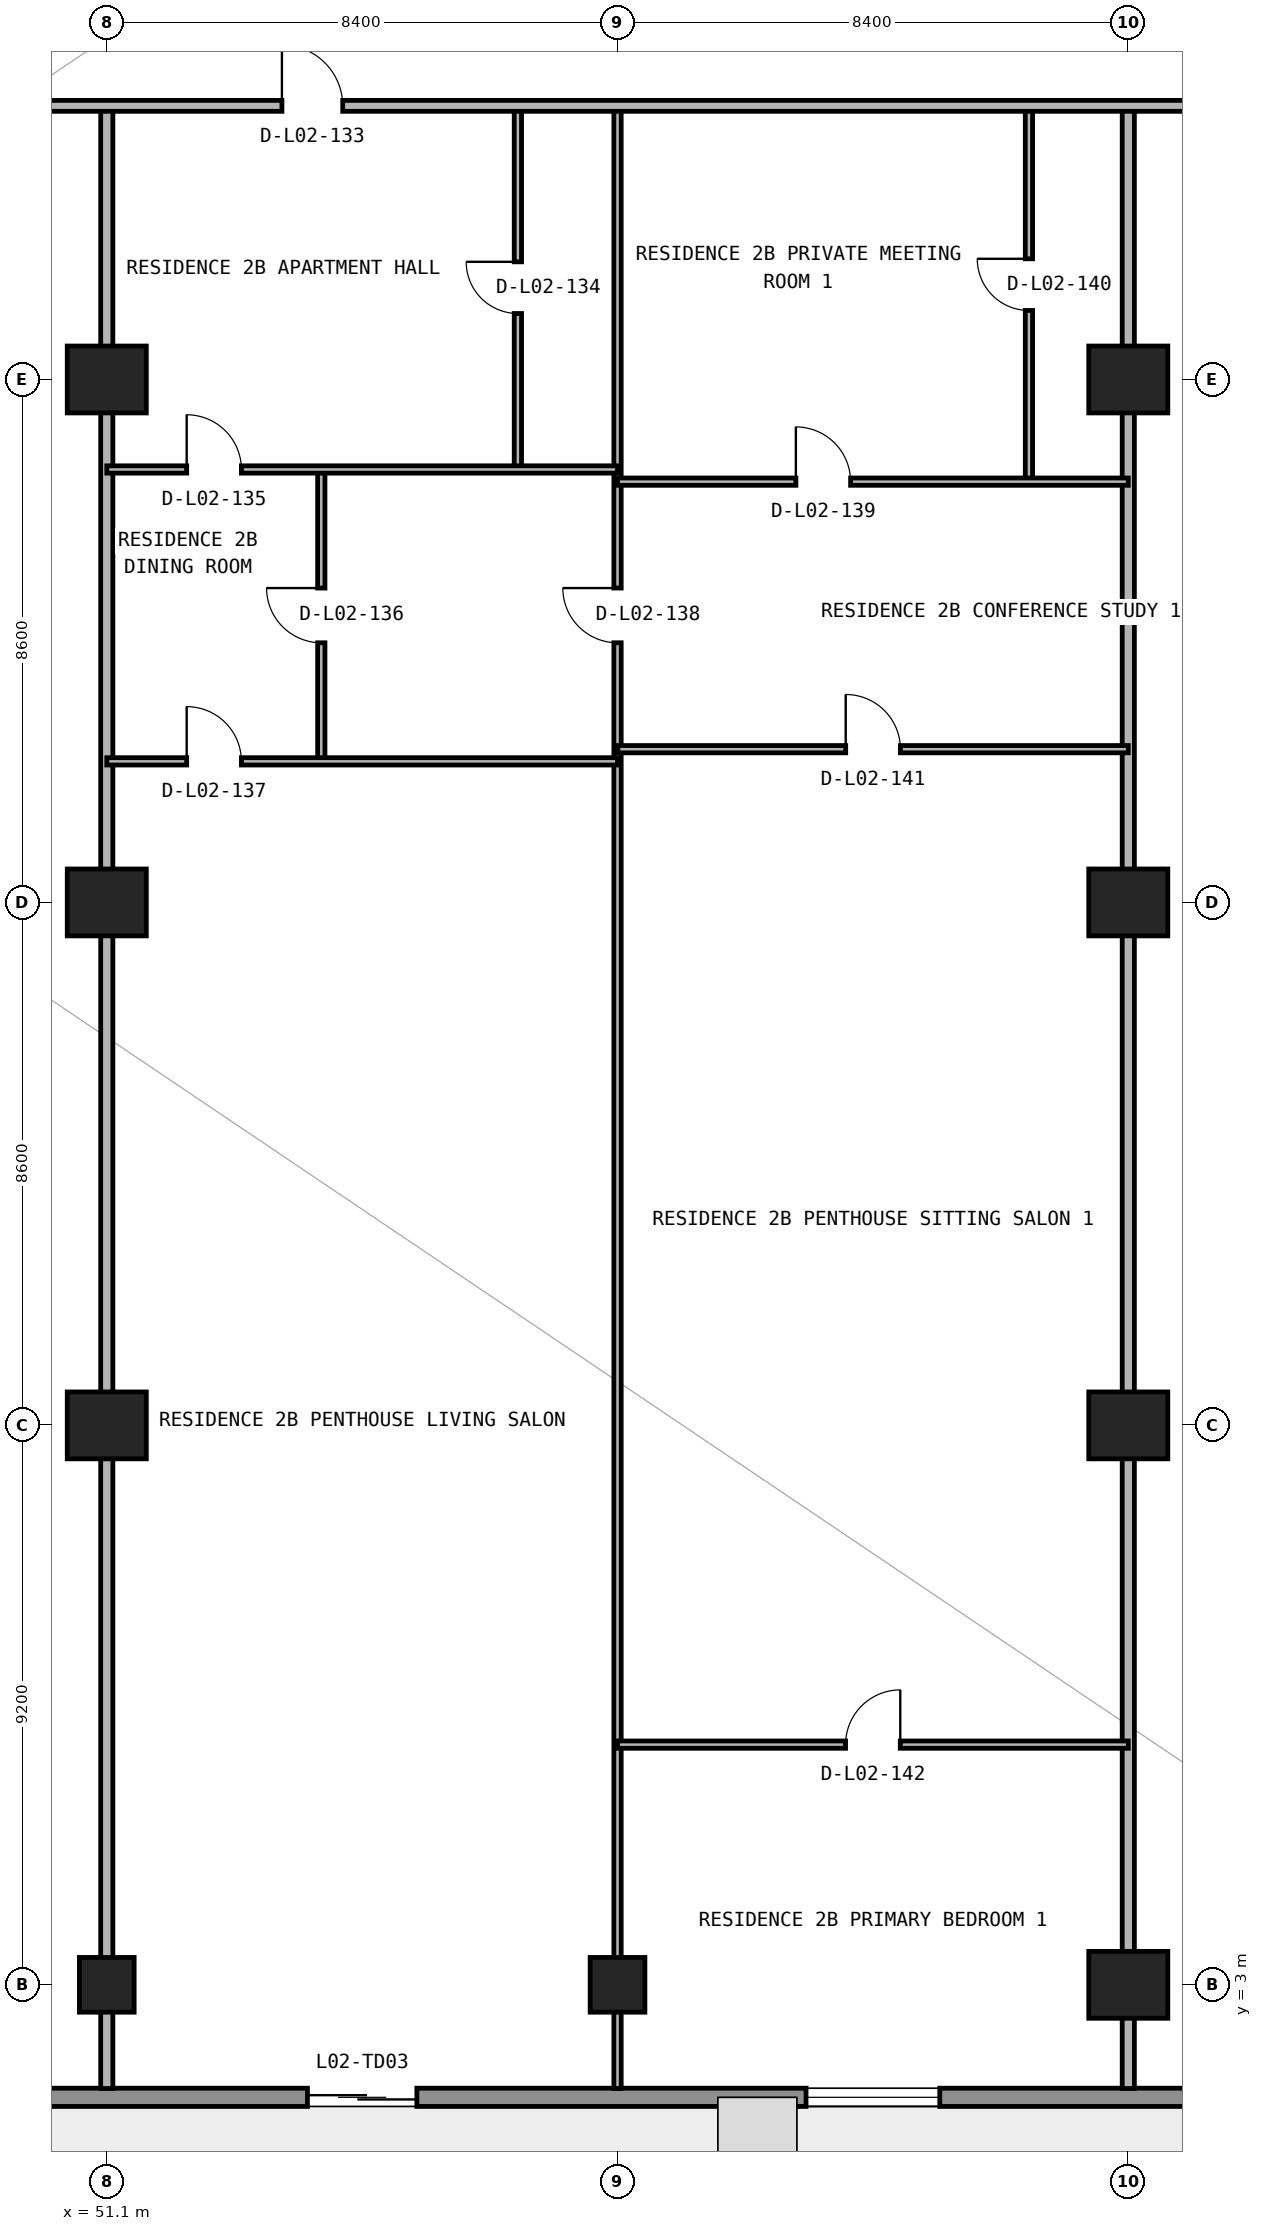
"""IFC4 building model, lengths in metres.
Left out: names, types, materials, properties, quantities, classifications, styles, units other than length and angle.
Written with IfcOpenShell. Run it as: python <this file> out.ifc"""

import sys

from ifc_helpers import new_model, si_unit, direction, frame, frame_2d, origin, origin_2d, place, context, subcontext, project, spatial, rectangle, circle, extrude, element, fill, save


model = new_model("IFC4")
c1 = context("Model", 3, precision=1e-05, world=origin(), true_north=direction((0.0, 1.0)))
c2 = subcontext(c1, "Body", "Model", "MODEL_VIEW")
j1 = project(units=[si_unit("LENGTHUNIT", "METRE"), si_unit("PLANEANGLEUNIT", "RADIAN")], contexts=[c1])
p1 = place(None, origin())
s1 = spatial("IfcSite", under=j1, at=p1, CompositionType="ELEMENT")
p2 = place(p1, origin())
s2 = spatial("IfcBuilding", under=s1, at=p2, CompositionType="ELEMENT")
p3 = place(p2, frame((0.0, 0.0, 10.2)))
s3 = spatial("IfcBuildingStorey", under=s2, at=p3, CompositionType="ELEMENT", Elevation=10.2)
for number, where, z_axis, x_axis in (
    (1, (51.1, 3.0, 0.0), (0.0, 0.0, 1.0), (1.0, 0.0, 0.0)),
    (2, (59.5, 3.0, 0.0), (0.0, 0.0, 1.0), (1.0, 0.0, 0.0)),
):
    element("IfcColumn", number, at=place(p3, frame(where, z_axis=z_axis, x_axis=x_axis)), inside=s3, PredefinedType="COLUMN", context=c2, shape_type="SweptSolid", body=[
        extrude(circle(Radius=0.45, at=origin_2d()), origin(), (0.0, 0.0, 1.0), 4.5),
    ])
for number, where, z_axis, x_axis in (
    (3, (67.9, 3.0, 0.0), (0.0, 0.0, 1.0), (1.0, 0.0, 0.0)),
    (4, (51.1, 12.2, 0.0), (0.0, 0.0, 1.0), (1.0, 0.0, 0.0)),
    (5, (67.9, 12.2, 0.0), (0.0, 0.0, 1.0), (1.0, 0.0, 0.0)),
    (6, (51.1, 20.8, 0.0), (0.0, 0.0, 1.0), (1.0, 0.0, 0.0)),
    (7, (67.9, 20.8, 0.0), (0.0, 0.0, 1.0), (1.0, 0.0, 0.0)),
    (8, (51.1, 29.4, 0.0), (0.0, 0.0, 1.0), (1.0, 0.0, 0.0)),
    (9, (67.9, 29.4, 0.0), (0.0, 0.0, 1.0), (1.0, 0.0, 0.0)),
):
    element("IfcColumn", number, at=place(p3, frame(where, z_axis=z_axis, x_axis=x_axis)), inside=s3, PredefinedType="COLUMN", context=c2, shape_type="SweptSolid", body=[
        extrude(rectangle(XDim=1.3, YDim=1.1, at=origin_2d()), origin(), (0.0, 0.0, 1.0), 4.5),
    ])
p4 = place(p3, frame((77.2, 1.15, 0.0), z_axis=(0.0, 0.0, 1.0), x_axis=(-1.0, 0.0, 0.0)))
e10 = element("IfcWall", 10, at=p4, inside=s3, PredefinedType="STANDARD", context=c2, shape_type="SweptSolid", body=[
    extrude(rectangle(XDim=76.6, YDim=0.3, at=frame_2d((38.3, 0.0))), origin(), (0.0, 0.0, 1.0), 4.5),
])
p5 = place(p4, frame((70.375, 0.0, 0.85)))
e11 = element("IfcOpeningElement", 11, at=p5, cuts=e10, PredefinedType="OPENING", context=c2, shape_type="SweptSolid", body=[
    extrude(rectangle(XDim=3.0, YDim=2.4, at=frame_2d((1.5, 1.2))), frame((0.0, 0.16, 0.0), z_axis=(0.0, -1.0, 0.0), x_axis=(1.0, 0.0, 0.0)), (0.0, 0.0, 1.0), 0.32),
])
p6 = place(p4, frame((62.2, 0.0, 0.0)))
e12 = element("IfcOpeningElement", 12, at=p6, cuts=e10, PredefinedType="OPENING", context=c2, shape_type="SweptSolid", body=[
    extrude(rectangle(XDim=1.8, YDim=2.3, at=frame_2d((0.9, 1.15))), frame((0.0, 0.16, 0.0), z_axis=(0.0, -1.0, 0.0), x_axis=(1.0, 0.0, 0.0)), (0.0, 0.0, 1.0), 0.32),
])
p7 = place(p4, frame((53.6, 0.0, 0.85)))
e13 = element("IfcOpeningElement", 13, at=p7, cuts=e10, PredefinedType="OPENING", context=c2, shape_type="SweptSolid", body=[
    extrude(rectangle(XDim=2.2, YDim=1.55, at=frame_2d((1.1, 0.775))), frame((0.0, 0.16, 0.0), z_axis=(0.0, -1.0, 0.0), x_axis=(1.0, 0.0, 0.0)), (0.0, 0.0, 1.0), 0.32),
])
p8 = place(p4, frame((37.4, 0.0, 0.0)))
e14 = element("IfcOpeningElement", 14, at=p8, cuts=e10, PredefinedType="OPENING", context=c2, shape_type="SweptSolid", body=[
    extrude(rectangle(XDim=1.8, YDim=2.3, at=frame_2d((0.9, 1.15))), frame((0.0, 0.16, 0.0), z_axis=(0.0, -1.0, 0.0), x_axis=(1.0, 0.0, 0.0)), (0.0, 0.0, 1.0), 0.32),
])
p9 = place(p4, frame((21.0, 0.0, 0.0)))
e15 = element("IfcOpeningElement", 15, at=p9, cuts=e10, PredefinedType="OPENING", context=c2, shape_type="SweptSolid", body=[
    extrude(rectangle(XDim=1.8, YDim=2.3, at=frame_2d((0.9, 1.15))), frame((0.0, 0.16, 0.0), z_axis=(0.0, -1.0, 0.0), x_axis=(1.0, 0.0, 0.0)), (0.0, 0.0, 1.0), 0.32),
])
p10 = place(p4, frame((12.4, 0.0, 0.85)))
e16 = element("IfcOpeningElement", 16, at=p10, cuts=e10, PredefinedType="OPENING", context=c2, shape_type="SweptSolid", body=[
    extrude(rectangle(XDim=2.2, YDim=1.55, at=frame_2d((1.1, 0.775))), frame((0.0, 0.16, 0.0), z_axis=(0.0, -1.0, 0.0), x_axis=(1.0, 0.0, 0.0)), (0.0, 0.0, 1.0), 0.32),
])
p11 = place(p4, frame((3.825, 0.0, 0.0)))
e17 = element("IfcOpeningElement", 17, at=p11, cuts=e10, PredefinedType="OPENING", context=c2, shape_type="SweptSolid", body=[
    extrude(rectangle(XDim=1.8, YDim=2.3, at=frame_2d((0.9, 1.15))), frame((0.0, 0.16, 0.0), z_axis=(0.0, -1.0, 0.0), x_axis=(1.0, 0.0, 0.0)), (0.0, 0.0, 1.0), 0.32),
])
p12 = place(p3, frame((51.1, 1.295, 0.0), z_axis=(0.0, 0.0, 1.0), x_axis=(0.0, 1.0, 0.0)))
e18 = element("IfcWall", 18, at=p12, inside=s3, PredefinedType="PARTITIONING", context=c2, shape_type="SweptSolid", body=[
    extrude(rectangle(XDim=32.605, YDim=0.2, at=frame_2d((16.302, 0.0))), origin(), (0.0, 0.0, 1.0), 3.464),
])
p13 = place(p3, frame((54.628, 23.12, 0.0), z_axis=(0.0, 0.0, 1.0), x_axis=(0.0, 1.0, 0.0)))
e19 = element("IfcWall", 19, at=p13, inside=s3, PredefinedType="PARTITIONING", context=c2, shape_type="SweptSolid", body=[
    extrude(rectangle(XDim=4.8, YDim=0.12, at=frame_2d((2.4, 0.0))), origin(), (0.0, 0.0, 1.0), 3.873),
])
p14 = place(p13, frame((1.95, 0.0, 0.0)))
e20 = element("IfcOpeningElement", 20, at=p14, cuts=e19, PredefinedType="OPENING", context=c2, shape_type="SweptSolid", body=[
    extrude(rectangle(XDim=0.9, YDim=2.15, at=frame_2d((0.45, 1.075))), frame((0.0, 0.07, 0.0), z_axis=(0.0, -1.0, 0.0), x_axis=(1.0, 0.0, 0.0)), (0.0, 0.0, 1.0), 0.14),
])
p15 = place(p3, frame((57.861, 27.92, 0.0), z_axis=(0.0, 0.0, 1.0), x_axis=(0.0, 1.0, 0.0)))
e21 = element("IfcWall", 21, at=p15, inside=s3, PredefinedType="PARTITIONING", context=c2, shape_type="SweptSolid", body=[
    extrude(rectangle(XDim=5.98, YDim=0.12, at=frame_2d((2.99, 0.0))), origin(), (0.0, 0.0, 1.0), 3.873),
])
p16 = place(p15, frame((2.565, 0.0, 0.0)))
e22 = element("IfcOpeningElement", 22, at=p16, cuts=e21, PredefinedType="OPENING", context=c2, shape_type="SweptSolid", body=[
    extrude(rectangle(XDim=0.85, YDim=2.1, at=frame_2d((0.425, 1.05))), frame((0.0, 0.07, 0.0), z_axis=(0.0, -1.0, 0.0), x_axis=(1.0, 0.0, 0.0)), (0.0, 0.0, 1.0), 0.14),
])
p17 = place(p3, frame((59.5, 1.295, 0.0), z_axis=(0.0, 0.0, 1.0), x_axis=(0.0, 1.0, 0.0)))
e23 = element("IfcWall", 23, at=p17, inside=s3, PredefinedType="PARTITIONING", context=c2, shape_type="SweptSolid", body=[
    extrude(rectangle(XDim=32.605, YDim=0.12, at=frame_2d((16.302, 0.0))), origin(), (0.0, 0.0, 1.0), 4.5),
])
p18 = place(p17, frame((23.775, 0.0, 0.0)))
e24 = element("IfcOpeningElement", 24, at=p18, cuts=e23, PredefinedType="OPENING", context=c2, shape_type="SweptSolid", body=[
    extrude(rectangle(XDim=0.9, YDim=2.15, at=frame_2d((0.45, 1.075))), frame((0.0, 0.07, 0.0), z_axis=(0.0, -1.0, 0.0), x_axis=(1.0, 0.0, 0.0)), (0.0, 0.0, 1.0), 0.14),
])
p19 = place(p3, frame((66.266, 27.72, 0.0), z_axis=(0.0, 0.0, 1.0), x_axis=(0.0, 1.0, 0.0)))
e25 = element("IfcWall", 25, at=p19, inside=s3, PredefinedType="PARTITIONING", context=c2, shape_type="SweptSolid", body=[
    extrude(rectangle(XDim=6.18, YDim=0.12, at=frame_2d((3.09, 0.0))), origin(), (0.0, 0.0, 1.0), 4.5),
])
p20 = place(p19, frame((2.815, 0.0, 0.0)))
e26 = element("IfcOpeningElement", 26, at=p20, cuts=e25, PredefinedType="OPENING", context=c2, shape_type="SweptSolid", body=[
    extrude(rectangle(XDim=0.85, YDim=2.1, at=frame_2d((0.425, 1.05))), frame((0.0, 0.07, 0.0), z_axis=(0.0, -1.0, 0.0), x_axis=(1.0, 0.0, 0.0)), (0.0, 0.0, 1.0), 0.14),
])
p21 = place(p3, frame((67.9, 1.295, 0.0), z_axis=(0.0, 0.0, 1.0), x_axis=(0.0, 1.0, 0.0)))
e27 = element("IfcWall", 27, at=p21, inside=s3, PredefinedType="PARTITIONING", context=c2, shape_type="SweptSolid", body=[
    extrude(rectangle(XDim=32.605, YDim=0.2, at=frame_2d((16.302, 0.0))), origin(), (0.0, 0.0, 1.0), 3.464),
])
p22 = place(p3, frame((59.5, 6.95, 0.0), z_axis=(0.0, 0.0, 1.0), x_axis=(1.0, 0.0, 0.0)))
e28 = element("IfcWall", 28, at=p22, inside=s3, PredefinedType="PARTITIONING", context=c2, shape_type="SweptSolid", body=[
    extrude(rectangle(XDim=8.4, YDim=0.12, at=frame_2d((4.2, 0.0))), origin(), (0.0, 0.0, 1.0), 4.5),
])
p23 = place(p22, frame((3.75, 0.0, 0.0)))
e29 = element("IfcOpeningElement", 29, at=p23, cuts=e28, PredefinedType="OPENING", context=c2, shape_type="SweptSolid", body=[
    extrude(rectangle(XDim=0.9, YDim=2.15, at=frame_2d((0.45, 1.075))), frame((0.0, 0.07, 0.0), z_axis=(0.0, -1.0, 0.0), x_axis=(1.0, 0.0, 0.0)), (0.0, 0.0, 1.0), 0.14),
])
p24 = place(p3, frame((51.1, 23.12, 0.0), z_axis=(0.0, 0.0, 1.0), x_axis=(1.0, 0.0, 0.0)))
e30 = element("IfcWall", 30, at=p24, inside=s3, PredefinedType="PARTITIONING", context=c2, shape_type="SweptSolid", body=[
    extrude(rectangle(XDim=8.4, YDim=0.12, at=frame_2d((4.2, 0.0))), origin(), (0.0, 0.0, 1.0), 4.5),
])
p25 = place(p24, frame((1.314, 0.0, 0.0)))
e31 = element("IfcOpeningElement", 31, at=p25, cuts=e30, PredefinedType="OPENING", context=c2, shape_type="SweptSolid", body=[
    extrude(rectangle(XDim=0.9, YDim=2.15, at=frame_2d((0.45, 1.075))), frame((0.0, 0.07, 0.0), z_axis=(0.0, -1.0, 0.0), x_axis=(1.0, 0.0, 0.0)), (0.0, 0.0, 1.0), 0.14),
])
p26 = place(p3, frame((59.505, 23.32, 0.0), z_axis=(0.0, 0.0, 1.0), x_axis=(1.0, 0.0, 0.0)))
e32 = element("IfcWall", 32, at=p26, inside=s3, PredefinedType="PARTITIONING", context=c2, shape_type="SweptSolid", body=[
    extrude(rectangle(XDim=8.395, YDim=0.12, at=frame_2d((4.198, 0.0))), origin(), (0.0, 0.0, 1.0), 4.5),
])
p27 = place(p26, frame((3.748, 0.0, 0.0)))
e33 = element("IfcOpeningElement", 33, at=p27, cuts=e32, PredefinedType="OPENING", context=c2, shape_type="SweptSolid", body=[
    extrude(rectangle(XDim=0.9, YDim=2.15, at=frame_2d((0.45, 1.075))), frame((0.0, 0.07, 0.0), z_axis=(0.0, -1.0, 0.0), x_axis=(1.0, 0.0, 0.0)), (0.0, 0.0, 1.0), 0.14),
])
p28 = place(p3, frame((59.5, 27.72, 0.0), z_axis=(0.0, 0.0, 1.0), x_axis=(1.0, 0.0, 0.0)))
e34 = element("IfcWall", 34, at=p28, inside=s3, PredefinedType="PARTITIONING", context=c2, shape_type="SweptSolid", body=[
    extrude(rectangle(XDim=8.4, YDim=0.12, at=frame_2d((4.2, 0.0))), origin(), (0.0, 0.0, 1.0), 4.5),
])
p29 = place(p28, frame((2.933, 0.0, 0.0)))
e35 = element("IfcOpeningElement", 35, at=p29, cuts=e34, PredefinedType="OPENING", context=c2, shape_type="SweptSolid", body=[
    extrude(rectangle(XDim=0.9, YDim=2.15, at=frame_2d((0.45, 1.075))), frame((0.0, 0.07, 0.0), z_axis=(0.0, -1.0, 0.0), x_axis=(1.0, 0.0, 0.0)), (0.0, 0.0, 1.0), 0.14),
])
p30 = place(p3, frame((51.1, 27.92, 0.0), z_axis=(0.0, 0.0, 1.0), x_axis=(1.0, 0.0, 0.0)))
e36 = element("IfcWall", 36, at=p30, inside=s3, PredefinedType="PARTITIONING", context=c2, shape_type="SweptSolid", body=[
    extrude(rectangle(XDim=8.4, YDim=0.12, at=frame_2d((4.2, 0.0))), origin(), (0.0, 0.0, 1.0), 4.5),
])
p31 = place(p30, frame((1.314, 0.0, 0.0)))
e37 = element("IfcOpeningElement", 37, at=p31, cuts=e36, PredefinedType="OPENING", context=c2, shape_type="SweptSolid", body=[
    extrude(rectangle(XDim=0.9, YDim=2.15, at=frame_2d((0.45, 1.075))), frame((0.0, 0.07, 0.0), z_axis=(0.0, -1.0, 0.0), x_axis=(1.0, 0.0, 0.0)), (0.0, 0.0, 1.0), 0.14),
])
p32 = place(p3, frame((0.895, 33.9, 0.0), z_axis=(0.0, 0.0, 1.0), x_axis=(1.0, 0.0, 0.0)))
e38 = element("IfcWall", 38, at=p32, inside=s3, PredefinedType="PARTITIONING", context=c2, shape_type="SweptSolid", body=[
    extrude(rectangle(XDim=76.01, YDim=0.18, at=frame_2d((38.005, 0.0))), origin(), (0.0, 0.0, 1.0), 4.5),
])
p33 = place(p32, frame((3.978, 0.0, 0.0)))
e39 = element("IfcOpeningElement", 39, at=p33, cuts=e38, PredefinedType="OPENING", context=c2, shape_type="SweptSolid", body=[
    extrude(rectangle(XDim=1.05, YDim=2.15, at=frame_2d((0.525, 1.075))), frame((0.0, 0.1, 0.0), z_axis=(0.0, -1.0, 0.0), x_axis=(1.0, 0.0, 0.0)), (0.0, 0.0, 1.0), 0.2),
])
p34 = place(p32, frame((11.695, 0.0, 0.0)))
e40 = element("IfcOpeningElement", 40, at=p34, cuts=e38, PredefinedType="OPENING", context=c2, shape_type="SweptSolid", body=[
    extrude(rectangle(XDim=1.0, YDim=2.2, at=frame_2d((0.5, 1.1))), frame((0.0, 0.1, 0.0), z_axis=(0.0, -1.0, 0.0), x_axis=(1.0, 0.0, 0.0)), (0.0, 0.0, 1.0), 0.2),
])
p35 = place(p32, frame((37.48, 0.0, 0.0)))
e41 = element("IfcOpeningElement", 41, at=p35, cuts=e38, PredefinedType="OPENING", context=c2, shape_type="SweptSolid", body=[
    extrude(rectangle(XDim=1.05, YDim=2.15, at=frame_2d((0.525, 1.075))), frame((0.0, 0.1, 0.0), z_axis=(0.0, -1.0, 0.0), x_axis=(1.0, 0.0, 0.0)), (0.0, 0.0, 1.0), 0.2),
])
p36 = place(p32, frame((53.085, 0.0, 0.0)))
e42 = element("IfcOpeningElement", 42, at=p36, cuts=e38, PredefinedType="OPENING", context=c2, shape_type="SweptSolid", body=[
    extrude(rectangle(XDim=1.0, YDim=2.2, at=frame_2d((0.5, 1.1))), frame((0.0, 0.1, 0.0), z_axis=(0.0, -1.0, 0.0), x_axis=(1.0, 0.0, 0.0)), (0.0, 0.0, 1.0), 0.2),
])
p37 = place(p32, frame((70.982, 0.0, 0.0)))
e43 = element("IfcOpeningElement", 43, at=p37, cuts=e38, PredefinedType="OPENING", context=c2, shape_type="SweptSolid", body=[
    extrude(rectangle(XDim=1.05, YDim=2.15, at=frame_2d((0.525, 1.075))), frame((0.0, 0.1, 0.0), z_axis=(0.0, -1.0, 0.0), x_axis=(1.0, 0.0, 0.0)), (0.0, 0.0, 1.0), 0.2),
])
p38 = place(p9, origin())
e44 = element("IfcDoor", 44, at=p38, inside=s3, OperationType="DOUBLE_DOOR_SLIDING", PredefinedType="DOOR", context=c2, shape_type="SweptSolid", body=[
    extrude(rectangle(XDim=1.8, YDim=2.3, at=frame_2d((0.9, 1.15))), frame((0.0, 0.025, 0.0), z_axis=(0.0, -1.0, 0.0), x_axis=(1.0, 0.0, 0.0)), (0.0, 0.0, 1.0), 0.05),
])
fill(e15, e44)
p39 = place(p10, origin())
e45 = element("IfcWindow", 45, at=p39, inside=s3, PartitioningType="SINGLE_PANEL", PredefinedType="WINDOW", context=c2, shape_type="SweptSolid", body=[
    extrude(rectangle(XDim=2.2, YDim=1.55, at=frame_2d((1.1, 0.775))), frame((0.0, 0.03, 0.0), z_axis=(0.0, -1.0, 0.0), x_axis=(1.0, 0.0, 0.0)), (0.0, 0.0, 1.0), 0.06),
])
fill(e16, e45)
p40 = place(p36, origin())
e46 = element("IfcDoor", 46, at=p40, inside=s3, OperationType="SINGLE_SWING_LEFT", PredefinedType="DOOR", context=c2, shape_type="SweptSolid", body=[
    extrude(rectangle(XDim=1.0, YDim=2.2, at=frame_2d((0.5, 1.1))), frame((0.0, 0.025, 0.0), z_axis=(0.0, -1.0, 0.0), x_axis=(1.0, 0.0, 0.0)), (0.0, 0.0, 1.0), 0.05),
])
fill(e42, e46)
p41 = place(p16, origin())
e47 = element("IfcDoor", 47, at=p41, inside=s3, OperationType="SINGLE_SWING_RIGHT", PredefinedType="DOOR", context=c2, shape_type="SweptSolid", body=[
    extrude(rectangle(XDim=0.85, YDim=2.1, at=frame_2d((0.425, 1.05))), frame((0.0, 0.025, 0.0), z_axis=(0.0, -1.0, 0.0), x_axis=(1.0, 0.0, 0.0)), (0.0, 0.0, 1.0), 0.05),
])
fill(e22, e47)
p42 = place(p31, origin())
e48 = element("IfcDoor", 48, at=p42, inside=s3, OperationType="SINGLE_SWING_LEFT", PredefinedType="DOOR", context=c2, shape_type="SweptSolid", body=[
    extrude(rectangle(XDim=0.9, YDim=2.15, at=frame_2d((0.45, 1.075))), frame((0.0, 0.025, 0.0), z_axis=(0.0, -1.0, 0.0), x_axis=(1.0, 0.0, 0.0)), (0.0, 0.0, 1.0), 0.05),
])
fill(e37, e48)
p43 = place(p14, origin())
e49 = element("IfcDoor", 49, at=p43, inside=s3, OperationType="SINGLE_SWING_RIGHT", PredefinedType="DOOR", context=c2, shape_type="SweptSolid", body=[
    extrude(rectangle(XDim=0.9, YDim=2.15, at=frame_2d((0.45, 1.075))), frame((0.0, 0.025, 0.0), z_axis=(0.0, -1.0, 0.0), x_axis=(1.0, 0.0, 0.0)), (0.0, 0.0, 1.0), 0.05),
])
fill(e20, e49)
p44 = place(p25, origin())
e50 = element("IfcDoor", 50, at=p44, inside=s3, OperationType="SINGLE_SWING_LEFT", PredefinedType="DOOR", context=c2, shape_type="SweptSolid", body=[
    extrude(rectangle(XDim=0.9, YDim=2.15, at=frame_2d((0.45, 1.075))), frame((0.0, 0.025, 0.0), z_axis=(0.0, -1.0, 0.0), x_axis=(1.0, 0.0, 0.0)), (0.0, 0.0, 1.0), 0.05),
])
fill(e31, e50)
p45 = place(p18, origin())
e51 = element("IfcDoor", 51, at=p45, inside=s3, OperationType="SINGLE_SWING_RIGHT", PredefinedType="DOOR", context=c2, shape_type="SweptSolid", body=[
    extrude(rectangle(XDim=0.9, YDim=2.15, at=frame_2d((0.45, 1.075))), frame((0.0, 0.025, 0.0), z_axis=(0.0, -1.0, 0.0), x_axis=(1.0, 0.0, 0.0)), (0.0, 0.0, 1.0), 0.05),
])
fill(e24, e51)
p46 = place(p29, origin())
e52 = element("IfcDoor", 52, at=p46, inside=s3, OperationType="SINGLE_SWING_LEFT", PredefinedType="DOOR", context=c2, shape_type="SweptSolid", body=[
    extrude(rectangle(XDim=0.9, YDim=2.15, at=frame_2d((0.45, 1.075))), frame((0.0, 0.025, 0.0), z_axis=(0.0, -1.0, 0.0), x_axis=(1.0, 0.0, 0.0)), (0.0, 0.0, 1.0), 0.05),
])
fill(e35, e52)
p47 = place(p20, origin())
e53 = element("IfcDoor", 53, at=p47, inside=s3, OperationType="SINGLE_SWING_RIGHT", PredefinedType="DOOR", context=c2, shape_type="SweptSolid", body=[
    extrude(rectangle(XDim=0.85, YDim=2.1, at=frame_2d((0.425, 1.05))), frame((0.0, 0.025, 0.0), z_axis=(0.0, -1.0, 0.0), x_axis=(1.0, 0.0, 0.0)), (0.0, 0.0, 1.0), 0.05),
])
fill(e26, e53)
p48 = place(p27, origin())
e54 = element("IfcDoor", 54, at=p48, inside=s3, OperationType="SINGLE_SWING_LEFT", PredefinedType="DOOR", context=c2, shape_type="SweptSolid", body=[
    extrude(rectangle(XDim=0.9, YDim=2.15, at=frame_2d((0.45, 1.075))), frame((0.0, 0.025, 0.0), z_axis=(0.0, -1.0, 0.0), x_axis=(1.0, 0.0, 0.0)), (0.0, 0.0, 1.0), 0.05),
])
fill(e33, e54)
p49 = place(p23, origin())
e55 = element("IfcDoor", 55, at=p49, inside=s3, OperationType="SINGLE_SWING_RIGHT", PredefinedType="DOOR", context=c2, shape_type="SweptSolid", body=[
    extrude(rectangle(XDim=0.9, YDim=2.15, at=frame_2d((0.45, 1.075))), frame((0.0, 0.025, 0.0), z_axis=(0.0, -1.0, 0.0), x_axis=(1.0, 0.0, 0.0)), (0.0, 0.0, 1.0), 0.05),
])
fill(e29, e55)
save(model, sys.argv[1])
